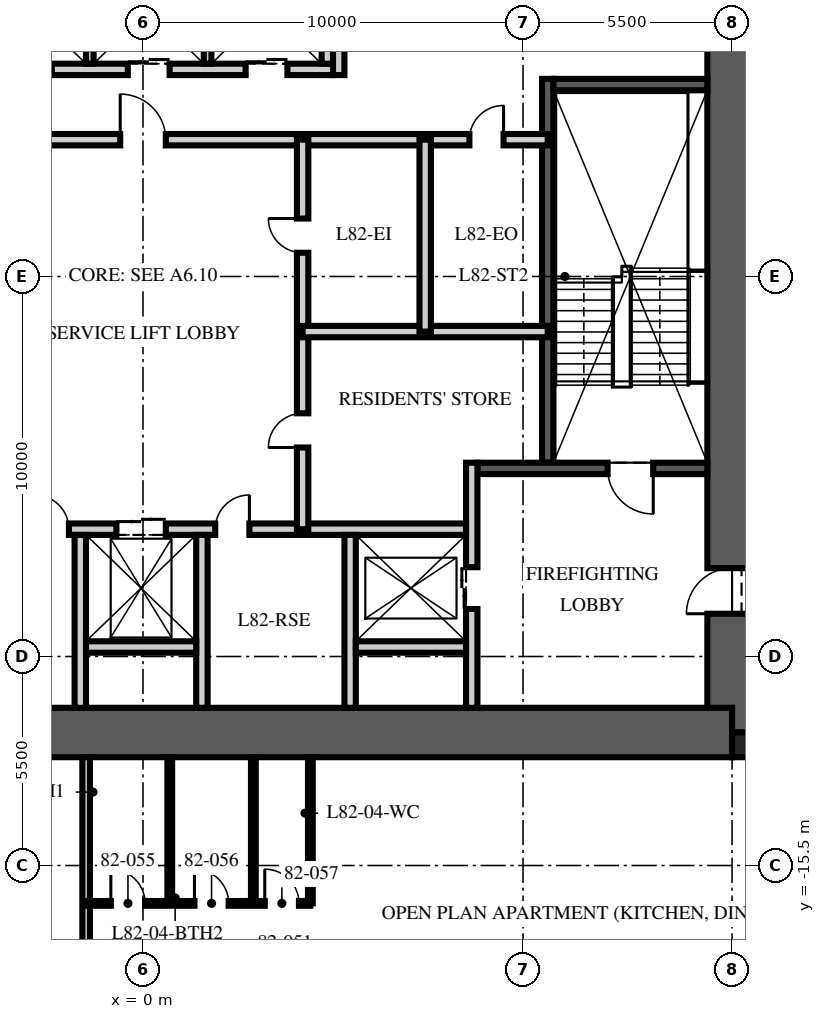
"""IFC4 building model, lengths in metres.
Left out: names, types, materials, properties, quantities, classifications, styles, units other than length and angle.
Written with IfcOpenShell. Run it as: python <this file> out.ifc"""

import sys

from ifc_helpers import new_model, si_unit, direction, frame, frame_2d, origin, origin_2d, place, context, subcontext, project, spatial, rectangle, extrude, element, fill, save


model = new_model("IFC4")
c1 = context("Model", 3, precision=1e-05, world=origin(), true_north=direction((0.0, 1.0)))
c2 = subcontext(c1, "Body", "Model", "MODEL_VIEW")
j1 = project(units=[si_unit("LENGTHUNIT", "METRE"), si_unit("PLANEANGLEUNIT", "RADIAN")], contexts=[c1])
p1 = place(None, origin())
s1 = spatial("IfcSite", under=j1, at=p1, CompositionType="ELEMENT")
p2 = place(p1, origin())
s2 = spatial("IfcBuilding", under=s1, at=p2, CompositionType="ELEMENT")
p3 = place(p2, frame((0.0, 0.0, 327.0)))
s3 = spatial("IfcBuildingStorey", under=s2, at=p3, CompositionType="ELEMENT", Elevation=327.0)
p4 = place(p3, frame((15.5, -12.0, -0.25), z_axis=(0.0, 0.0, 1.0), x_axis=(0.0, 1.0, 0.0)))
e1 = element("IfcWall", 1, at=p4, inside=s3, PredefinedType="SHEAR", context=c2, shape_type="SweptSolid", body=[
    extrude(rectangle(XDim=24.0, YDim=1.3, at=frame_2d((12.0, 0.0))), origin(), (0.0, 0.0, 1.0), 3.75),
])
p5 = place(p4, frame((3.125, 0.0, 0.25)))
e2 = element("IfcOpeningElement", 2, at=p5, cuts=e1, PredefinedType="OPENING", context=c2, shape_type="SweptSolid", body=[
    extrude(rectangle(XDim=1.2, YDim=2.1, at=frame_2d((0.6, 1.05))), frame((0.0, 0.66, 0.0), z_axis=(0.0, -1.0, 0.0), x_axis=(1.0, 0.0, 0.0)), (0.0, 0.0, 1.0), 1.32),
])
p6 = place(p4, frame((19.375, 0.0, 0.25)))
e3 = element("IfcOpeningElement", 3, at=p6, cuts=e1, PredefinedType="OPENING", context=c2, shape_type="SweptSolid", body=[
    extrude(rectangle(XDim=1.8, YDim=2.1, at=frame_2d((0.9, 1.05))), frame((0.0, 0.66, 0.0), z_axis=(0.0, -1.0, 0.0), x_axis=(1.0, 0.0, 0.0)), (0.0, 0.0, 1.0), 1.32),
])
p7 = place(p3, frame((-15.5, -12.0, -0.25), z_axis=(0.0, 0.0, 1.0), x_axis=(1.0, 0.0, 0.0)))
e4 = element("IfcWall", 4, at=p7, inside=s3, PredefinedType="SHEAR", context=c2, shape_type="SweptSolid", body=[
    extrude(rectangle(XDim=31.0, YDim=1.3, at=frame_2d((15.5, 0.0))), origin(), (0.0, 0.0, 1.0), 3.75),
])
p8 = place(p3, frame((15.825, -12.325, -0.25), z_axis=(0.0, 0.0, 1.0), x_axis=(1.0, 0.0, 0.0)))
e5 = element("IfcColumn", 5, at=p8, inside=s3, PredefinedType="COLUMN", context=c2, shape_type="SweptSolid", body=[
    extrude(rectangle(XDim=0.65, YDim=0.65, at=origin_2d()), origin(), (0.0, 0.0, 1.0), 3.75),
])
p9 = place(p3, frame((10.65, -4.9, 0.0), z_axis=(0.0, 0.0, 1.0), x_axis=(0.0, 1.0, 0.0)))
e6 = element("IfcWall", 6, at=p9, inside=s3, PredefinedType="SOLIDWALL", context=c2, shape_type="SweptSolid", body=[
    extrude(rectangle(XDim=10.1, YDim=0.3, at=frame_2d((5.05, 0.0))), origin(), (0.0, 0.0, 1.0), 3.5),
])
p10 = place(p3, frame((14.85, -5.05, 0.0), z_axis=(0.0, 0.0, 1.0), x_axis=(-1.0, 0.0, 0.0)))
e7 = element("IfcWall", 7, at=p10, inside=s3, PredefinedType="SOLIDWALL", context=c2, shape_type="SweptSolid", body=[
    extrude(rectangle(XDim=6.05, YDim=0.3, at=frame_2d((3.025, 0.0))), origin(), (0.0, 0.0, 1.0), 3.5),
])
p11 = place(p10, frame((1.425, 0.0, 0.0)))
e8 = element("IfcOpeningElement", 8, at=p11, cuts=e7, PredefinedType="OPENING", context=c2, shape_type="SweptSolid", body=[
    extrude(rectangle(XDim=1.2, YDim=2.1, at=frame_2d((0.6, 1.05))), frame((0.0, 0.16, 0.0), z_axis=(0.0, -1.0, 0.0), x_axis=(1.0, 0.0, 0.0)), (0.0, 0.0, 1.0), 0.32),
])
p12 = place(p3, frame((14.85, 5.05, 0.0), z_axis=(0.0, 0.0, 1.0), x_axis=(-1.0, 0.0, 0.0)))
e9 = element("IfcWall", 9, at=p12, inside=s3, PredefinedType="SOLIDWALL", context=c2, shape_type="SweptSolid", body=[
    extrude(rectangle(XDim=4.05, YDim=0.3, at=frame_2d((2.025, 0.0))), origin(), (0.0, 0.0, 1.0), 3.5),
])
p13 = place(p3, frame((8.65, -11.35, 0.0), z_axis=(0.0, 0.0, 1.0), x_axis=(0.0, 1.0, 0.0)))
e10 = element("IfcWall", 10, at=p13, inside=s3, PredefinedType="PARTITIONING", context=c2, shape_type="SweptSolid", body=[
    extrude(rectangle(XDim=6.45, YDim=0.3, at=frame_2d((3.225, 0.0))), origin(), (0.0, 0.0, 1.0), 3.5),
])
p14 = place(p13, frame((2.6, 0.0, 0.0)))
e11 = element("IfcOpeningElement", 11, at=p14, cuts=e10, PredefinedType="OPENING", context=c2, shape_type="SweptSolid", body=[
    extrude(rectangle(XDim=1.1, YDim=2.1, at=frame_2d((0.55, 1.05))), frame((0.0, 0.16, 0.0), z_axis=(0.0, -1.0, 0.0), x_axis=(1.0, 0.0, 0.0)), (0.0, 0.0, 1.0), 0.32),
])
p15 = place(p3, frame((-8.5, -6.65, 0.0), z_axis=(0.0, 0.0, 1.0), x_axis=(1.0, 0.0, 0.0)))
e12 = element("IfcWall", 12, at=p15, inside=s3, PredefinedType="PARTITIONING", context=c2, shape_type="SweptSolid", body=[
    extrude(rectangle(XDim=17.0, YDim=0.3, at=frame_2d((8.5, 0.0))), origin(), (0.0, 0.0, 1.0), 3.5),
])
p16 = place(p15, frame((7.8, 0.0, 0.0)))
e13 = element("IfcOpeningElement", 13, at=p16, cuts=e12, PredefinedType="OPENING", context=c2, shape_type="SweptSolid", body=[
    extrude(rectangle(XDim=1.3, YDim=2.4, at=frame_2d((0.65, 1.2))), frame((0.0, 0.16, 0.0), z_axis=(0.0, -1.0, 0.0), x_axis=(1.0, 0.0, 0.0)), (0.0, 0.0, 1.0), 0.32),
])
p17 = place(p15, frame((5.65, 0.0, 0.0)))
e14 = element("IfcOpeningElement", 14, at=p17, cuts=e12, PredefinedType="OPENING", context=c2, shape_type="SweptSolid", body=[
    extrude(rectangle(XDim=0.9, YDim=2.1, at=frame_2d((0.45, 1.05))), frame((0.0, 0.16, 0.0), z_axis=(0.0, -1.0, 0.0), x_axis=(1.0, 0.0, 0.0)), (0.0, 0.0, 1.0), 0.32),
])
p18 = place(p15, frame((10.4, 0.0, 0.0)))
e15 = element("IfcOpeningElement", 15, at=p18, cuts=e12, PredefinedType="OPENING", context=c2, shape_type="SweptSolid", body=[
    extrude(rectangle(XDim=0.9, YDim=2.1, at=frame_2d((0.45, 1.05))), frame((0.0, 0.16, 0.0), z_axis=(0.0, -1.0, 0.0), x_axis=(1.0, 0.0, 0.0)), (0.0, 0.0, 1.0), 0.32),
])
for number, where, z_axis, x_axis in (
    (16, (-1.65, -11.35, 0.0), (0.0, 0.0, 1.0), (0.0, 1.0, 0.0)),
    (17, (1.55, -11.35, 0.0), (0.0, 0.0, 1.0), (0.0, 1.0, 0.0)),
    (18, (5.45, -11.35, 0.0), (0.0, 0.0, 1.0), (0.0, 1.0, 0.0)),
):
    element("IfcWall", number, at=place(p3, frame(where, z_axis=z_axis, x_axis=x_axis)), inside=s3, PredefinedType="PARTITIONING", context=c2, shape_type="SweptSolid", body=[
        extrude(rectangle(XDim=4.55, YDim=0.3, at=frame_2d((2.275, 0.0))), origin(), (0.0, 0.0, 1.0), 3.5),
    ])
for number, where, z_axis, x_axis in (
    (19, (-1.5, -9.75, 0.0), (0.0, 0.0, 1.0), (1.0, 0.0, 0.0)),
    (20, (5.6, -9.75, 0.0), (0.0, 0.0, 1.0), (1.0, 0.0, 0.0)),
):
    element("IfcWall", number, at=place(p3, frame(where, z_axis=z_axis, x_axis=x_axis)), inside=s3, PredefinedType="PARTITIONING", context=c2, shape_type="SweptSolid", body=[
        extrude(rectangle(XDim=2.9, YDim=0.3, at=frame_2d((1.45, 0.0))), origin(), (0.0, 0.0, 1.0), 3.5),
    ])
p19 = place(p3, frame((-4.7, 5.45, 0.0), z_axis=(0.0, 0.0, 1.0), x_axis=(1.0, 0.0, 0.0)))
e21 = element("IfcWall", 21, at=p19, inside=s3, PredefinedType="PARTITIONING", context=c2, shape_type="SweptSolid", body=[
    extrude(rectangle(XDim=9.7, YDim=0.3, at=frame_2d((4.85, 0.0))), origin(), (0.0, 0.0, 1.0), 3.5),
])
p20 = place(p19, frame((1.2, 0.0, 0.0)))
e22 = element("IfcOpeningElement", 22, at=p20, cuts=e21, PredefinedType="OPENING", context=c2, shape_type="SweptSolid", body=[
    extrude(rectangle(XDim=1.1, YDim=2.1, at=frame_2d((0.55, 1.05))), frame((0.0, 0.16, 0.0), z_axis=(0.0, -1.0, 0.0), x_axis=(1.0, 0.0, 0.0)), (0.0, 0.0, 1.0), 0.32),
])
p21 = place(p19, frame((4.3, 0.0, 0.0)))
e23 = element("IfcOpeningElement", 23, at=p21, cuts=e21, PredefinedType="OPENING", context=c2, shape_type="SweptSolid", body=[
    extrude(rectangle(XDim=1.1, YDim=2.1, at=frame_2d((0.55, 1.05))), frame((0.0, 0.16, 0.0), z_axis=(0.0, -1.0, 0.0), x_axis=(1.0, 0.0, 0.0)), (0.0, 0.0, 1.0), 0.32),
])
p22 = place(p19, frame((7.4, 0.0, 0.0)))
e24 = element("IfcOpeningElement", 24, at=p22, cuts=e21, PredefinedType="OPENING", context=c2, shape_type="SweptSolid", body=[
    extrude(rectangle(XDim=1.1, YDim=2.1, at=frame_2d((0.55, 1.05))), frame((0.0, 0.16, 0.0), z_axis=(0.0, -1.0, 0.0), x_axis=(1.0, 0.0, 0.0)), (0.0, 0.0, 1.0), 0.32),
])
p23 = place(p3, frame((4.85, 5.6, 0.0), z_axis=(0.0, 0.0, 1.0), x_axis=(0.0, 1.0, 0.0)))
e25 = element("IfcWall", 25, at=p23, inside=s3, PredefinedType="PARTITIONING", context=c2, shape_type="SweptSolid", body=[
    extrude(rectangle(XDim=2.8, YDim=0.3, at=frame_2d((1.4, 0.0))), origin(), (0.0, 0.0, 1.0), 3.5),
])
for number, where, z_axis, x_axis in (
    (26, (-1.4, 5.6, 0.0), (0.0, 0.0, 1.0), (0.0, 1.0, 0.0)),
    (27, (1.7, 5.6, 0.0), (0.0, 0.0, 1.0), (0.0, 1.0, 0.0)),
):
    element("IfcWall", number, at=place(p3, frame(where, z_axis=z_axis, x_axis=x_axis)), inside=s3, PredefinedType="PARTITIONING", context=c2, shape_type="SweptSolid", body=[
        extrude(rectangle(XDim=2.8, YDim=0.2, at=frame_2d((1.4, 0.0))), origin(), (0.0, 0.0, 1.0), 3.5),
    ])
p24 = place(p3, frame((-10.65, 3.6, 0.0), z_axis=(0.0, 0.0, 1.0), x_axis=(1.0, 0.0, 0.0)))
e28 = element("IfcWall", 28, at=p24, inside=s3, PredefinedType="PARTITIONING", context=c2, shape_type="SweptSolid", body=[
    extrude(rectangle(XDim=21.3, YDim=0.3, at=frame_2d((10.65, 0.0))), origin(), (0.0, 0.0, 1.0), 3.5),
])
p25 = place(p24, frame((10.05, 0.0, 0.0)))
e29 = element("IfcOpeningElement", 29, at=p25, cuts=e28, PredefinedType="OPENING", context=c2, shape_type="SweptSolid", body=[
    extrude(rectangle(XDim=1.2, YDim=2.1, at=frame_2d((0.6, 1.05))), frame((0.0, 0.16, 0.0), z_axis=(0.0, -1.0, 0.0), x_axis=(1.0, 0.0, 0.0)), (0.0, 0.0, 1.0), 0.32),
])
p26 = place(p24, frame((19.238, 0.0, 0.0)))
e30 = element("IfcOpeningElement", 30, at=p26, cuts=e28, PredefinedType="OPENING", context=c2, shape_type="SweptSolid", body=[
    extrude(rectangle(XDim=0.9, YDim=2.1, at=frame_2d((0.45, 1.05))), frame((0.0, 0.16, 0.0), z_axis=(0.0, -1.0, 0.0), x_axis=(1.0, 0.0, 0.0)), (0.0, 0.0, 1.0), 0.32),
])
p27 = place(p3, frame((4.2, -6.65, 0.0), z_axis=(0.0, 0.0, 1.0), x_axis=(0.0, 1.0, 0.0)))
e31 = element("IfcWall", 31, at=p27, inside=s3, PredefinedType="PARTITIONING", context=c2, shape_type="SweptSolid", body=[
    extrude(rectangle(XDim=10.25, YDim=0.3, at=frame_2d((5.125, 0.0))), origin(), (0.0, 0.0, 1.0), 3.5),
])
p28 = place(p27, frame((2.15, 0.0, 0.0)))
e32 = element("IfcOpeningElement", 32, at=p28, cuts=e31, PredefinedType="OPENING", context=c2, shape_type="SweptSolid", body=[
    extrude(rectangle(XDim=0.9, YDim=2.1, at=frame_2d((0.45, 1.05))), frame((0.0, 0.16, 0.0), z_axis=(0.0, -1.0, 0.0), x_axis=(1.0, 0.0, 0.0)), (0.0, 0.0, 1.0), 0.32),
])
p29 = place(p27, frame((7.275, 0.0, 0.0)))
e33 = element("IfcOpeningElement", 33, at=p29, cuts=e31, PredefinedType="OPENING", context=c2, shape_type="SweptSolid", body=[
    extrude(rectangle(XDim=0.9, YDim=2.1, at=frame_2d((0.45, 1.05))), frame((0.0, 0.16, 0.0), z_axis=(0.0, -1.0, 0.0), x_axis=(1.0, 0.0, 0.0)), (0.0, 0.0, 1.0), 0.32),
])
p30 = place(p3, frame((10.65, -1.45, 0.0), z_axis=(0.0, 0.0, 1.0), x_axis=(-1.0, 0.0, 0.0)))
e34 = element("IfcWall", 34, at=p30, inside=s3, PredefinedType="PARTITIONING", context=c2, shape_type="SweptSolid", body=[
    extrude(rectangle(XDim=6.45, YDim=0.3, at=frame_2d((3.225, 0.0))), origin(), (0.0, 0.0, 1.0), 3.5),
])
p31 = place(p3, frame((7.425, -1.45, 0.0), z_axis=(0.0, 0.0, 1.0), x_axis=(0.0, 1.0, 0.0)))
e35 = element("IfcWall", 35, at=p31, inside=s3, PredefinedType="PARTITIONING", context=c2, shape_type="SweptSolid", body=[
    extrude(rectangle(XDim=5.05, YDim=0.3, at=frame_2d((2.525, 0.0))), origin(), (0.0, 0.0, 1.0), 3.5),
])
p32 = place(p3, frame((5.15, 5.3, 0.0), z_axis=(0.0, 0.0, 1.0), x_axis=(0.0, 1.0, 0.0)))
e36 = element("IfcWall", 36, at=p32, inside=s3, PredefinedType="PARTITIONING", context=c2, shape_type="SweptSolid", body=[
    extrude(rectangle(XDim=6.05, YDim=0.3, at=frame_2d((3.025, 0.0))), origin(), (0.0, 0.0, 1.0), 3.5),
])
p33 = place(p32, frame((4.225, 0.0, 0.0)))
e37 = element("IfcOpeningElement", 37, at=p33, cuts=e36, PredefinedType="OPENING", context=c2, shape_type="SweptSolid", body=[
    extrude(rectangle(XDim=0.9, YDim=2.1, at=frame_2d((0.45, 1.05))), frame((0.0, 0.16, 0.0), z_axis=(0.0, -1.0, 0.0), x_axis=(1.0, 0.0, 0.0)), (0.0, 0.0, 1.0), 0.32),
])
p34 = place(p3, frame((-1.496, -12.65, 0.0), z_axis=(0.0, 0.0, 1.0), x_axis=(0.0, -1.0, 0.0)))
e38 = element("IfcWall", 38, at=p34, inside=s3, PredefinedType="PARTITIONING", context=c2, shape_type="SweptSolid", body=[
    extrude(rectangle(XDim=10.6, YDim=0.2, at=frame_2d((5.3, 0.0))), origin(), (0.0, 0.0, 1.0), 3.01),
])
p35 = place(p3, frame((-1.496, -16.496, 0.0), z_axis=(0.0, 0.0, 1.0), x_axis=(1.0, 0.0, 0.0)))
e39 = element("IfcWall", 39, at=p35, inside=s3, PredefinedType="PARTITIONING", context=c2, shape_type="SweptSolid", body=[
    extrude(rectangle(XDim=5.9, YDim=0.125, at=frame_2d((2.95, 0.0))), origin(), (0.0, 0.0, 1.0), 2.9),
])
p36 = place(p35, frame((0.65, 0.0, 0.0)))
e40 = element("IfcOpeningElement", 40, at=p36, cuts=e39, PredefinedType="OPENING", context=c2, shape_type="SweptSolid", body=[
    extrude(rectangle(XDim=0.9, YDim=2.1, at=frame_2d((0.45, 1.05))), frame((0.0, 0.073, 0.0), z_axis=(0.0, -1.0, 0.0), x_axis=(1.0, 0.0, 0.0)), (0.0, 0.0, 1.0), 0.145),
])
p37 = place(p35, frame((2.85, 0.0, 0.0)))
e41 = element("IfcOpeningElement", 41, at=p37, cuts=e39, PredefinedType="OPENING", context=c2, shape_type="SweptSolid", body=[
    extrude(rectangle(XDim=0.9, YDim=2.1, at=frame_2d((0.45, 1.05))), frame((0.0, 0.073, 0.0), z_axis=(0.0, -1.0, 0.0), x_axis=(1.0, 0.0, 0.0)), (0.0, 0.0, 1.0), 0.145),
])
p38 = place(p35, frame((4.7, 0.0, 0.0)))
e42 = element("IfcOpeningElement", 42, at=p38, cuts=e39, PredefinedType="OPENING", context=c2, shape_type="SweptSolid", body=[
    extrude(rectangle(XDim=0.9, YDim=2.1, at=frame_2d((0.45, 1.05))), frame((0.0, 0.073, 0.0), z_axis=(0.0, -1.0, 0.0), x_axis=(1.0, 0.0, 0.0)), (0.0, 0.0, 1.0), 0.145),
])
for number, where, z_axis, x_axis in (
    (43, (0.704, -12.65, 0.0), (0.0, 0.0, 1.0), (0.0, -1.0, 0.0)),
    (44, (2.904, -12.65, 0.0), (0.0, 0.0, 1.0), (0.0, -1.0, 0.0)),
    (45, (4.404, -12.65, 0.0), (0.0, 0.0, 1.0), (0.0, -1.0, 0.0)),
):
    element("IfcWall", number, at=place(p3, frame(where, z_axis=z_axis, x_axis=x_axis)), inside=s3, PredefinedType="PARTITIONING", context=c2, shape_type="SweptSolid", body=[
        extrude(rectangle(XDim=3.846, YDim=0.125, at=frame_2d((1.923, 0.0))), origin(), (0.0, 0.0, 1.0), 3.5),
    ])
p39 = place(p11, origin())
e46 = element("IfcDoor", 46, at=p39, inside=s3, OperationType="SINGLE_SWING_LEFT", PredefinedType="DOOR", context=c2, shape_type="SweptSolid", body=[
    extrude(rectangle(XDim=1.2, YDim=2.1, at=frame_2d((0.6, 1.05))), frame((0.0, 0.025, 0.0), z_axis=(0.0, -1.0, 0.0), x_axis=(1.0, 0.0, 0.0)), (0.0, 0.0, 1.0), 0.05),
])
fill(e8, e46)
p40 = place(p5, origin())
e47 = element("IfcDoor", 47, at=p40, inside=s3, OperationType="SINGLE_SWING_LEFT", PredefinedType="DOOR", context=c2, shape_type="SweptSolid", body=[
    extrude(rectangle(XDim=1.2, YDim=2.1, at=frame_2d((0.6, 1.05))), frame((0.0, 0.025, 0.0), z_axis=(0.0, -1.0, 0.0), x_axis=(1.0, 0.0, 0.0)), (0.0, 0.0, 1.0), 0.05),
])
fill(e2, e47)
p41 = place(p14, origin())
e48 = element("IfcDoor", 48, at=p41, inside=s3, OperationType="DOUBLE_DOOR_SLIDING", PredefinedType="DOOR", context=c2, shape_type="SweptSolid", body=[
    extrude(rectangle(XDim=1.1, YDim=2.1, at=frame_2d((0.55, 1.05))), frame((0.0, 0.025, 0.0), z_axis=(0.0, -1.0, 0.0), x_axis=(1.0, 0.0, 0.0)), (0.0, 0.0, 1.0), 0.05),
])
fill(e11, e48)
p42 = place(p21, origin())
e49 = element("IfcDoor", 49, at=p42, inside=s3, OperationType="DOUBLE_DOOR_SLIDING", PredefinedType="DOOR", context=c2, shape_type="SweptSolid", body=[
    extrude(rectangle(XDim=1.1, YDim=2.1, at=frame_2d((0.55, 1.05))), frame((0.0, 0.025, 0.0), z_axis=(0.0, -1.0, 0.0), x_axis=(1.0, 0.0, 0.0)), (0.0, 0.0, 1.0), 0.05),
])
fill(e23, e49)
p43 = place(p22, origin())
e50 = element("IfcDoor", 50, at=p43, inside=s3, OperationType="DOUBLE_DOOR_SLIDING", PredefinedType="DOOR", context=c2, shape_type="SweptSolid", body=[
    extrude(rectangle(XDim=1.1, YDim=2.1, at=frame_2d((0.55, 1.05))), frame((0.0, 0.025, 0.0), z_axis=(0.0, -1.0, 0.0), x_axis=(1.0, 0.0, 0.0)), (0.0, 0.0, 1.0), 0.05),
])
fill(e24, e50)
p44 = place(p16, origin())
e51 = element("IfcDoor", 51, at=p44, inside=s3, OperationType="DOUBLE_DOOR_SLIDING", PredefinedType="DOOR", context=c2, shape_type="SweptSolid", body=[
    extrude(rectangle(XDim=1.3, YDim=2.4, at=frame_2d((0.65, 1.2))), frame((0.0, 0.025, 0.0), z_axis=(0.0, -1.0, 0.0), x_axis=(1.0, 0.0, 0.0)), (0.0, 0.0, 1.0), 0.05),
])
fill(e13, e51)
p45 = place(p25, origin())
e52 = element("IfcDoor", 52, at=p45, inside=s3, OperationType="SINGLE_SWING_LEFT", PredefinedType="DOOR", context=c2, shape_type="SweptSolid", body=[
    extrude(rectangle(XDim=1.2, YDim=2.1, at=frame_2d((0.6, 1.05))), frame((0.0, 0.025, 0.0), z_axis=(0.0, -1.0, 0.0), x_axis=(1.0, 0.0, 0.0)), (0.0, 0.0, 1.0), 0.05),
])
fill(e29, e52)
p46 = place(p17, origin())
e53 = element("IfcDoor", 53, at=p46, inside=s3, OperationType="SINGLE_SWING_LEFT", PredefinedType="DOOR", context=c2, shape_type="SweptSolid", body=[
    extrude(rectangle(XDim=0.9, YDim=2.1, at=frame_2d((0.45, 1.05))), frame((0.0, 0.025, 0.0), z_axis=(0.0, -1.0, 0.0), x_axis=(1.0, 0.0, 0.0)), (0.0, 0.0, 1.0), 0.05),
])
fill(e14, e53)
p47 = place(p18, origin())
e54 = element("IfcDoor", 54, at=p47, inside=s3, OperationType="SINGLE_SWING_RIGHT", PredefinedType="DOOR", context=c2, shape_type="SweptSolid", body=[
    extrude(rectangle(XDim=0.9, YDim=2.1, at=frame_2d((0.45, 1.05))), frame((0.0, 0.025, 0.0), z_axis=(0.0, -1.0, 0.0), x_axis=(1.0, 0.0, 0.0)), (0.0, 0.0, 1.0), 0.05),
])
fill(e15, e54)
p48 = place(p28, origin())
e55 = element("IfcDoor", 55, at=p48, inside=s3, OperationType="SINGLE_SWING_LEFT", PredefinedType="DOOR", context=c2, shape_type="SweptSolid", body=[
    extrude(rectangle(XDim=0.9, YDim=2.1, at=frame_2d((0.45, 1.05))), frame((0.0, 0.025, 0.0), z_axis=(0.0, -1.0, 0.0), x_axis=(1.0, 0.0, 0.0)), (0.0, 0.0, 1.0), 0.05),
])
fill(e32, e55)
p49 = place(p29, origin())
e56 = element("IfcDoor", 56, at=p49, inside=s3, OperationType="SINGLE_SWING_RIGHT", PredefinedType="DOOR", context=c2, shape_type="SweptSolid", body=[
    extrude(rectangle(XDim=0.9, YDim=2.1, at=frame_2d((0.45, 1.05))), frame((0.0, 0.025, 0.0), z_axis=(0.0, -1.0, 0.0), x_axis=(1.0, 0.0, 0.0)), (0.0, 0.0, 1.0), 0.05),
])
fill(e33, e56)
p50 = place(p26, origin())
e57 = element("IfcDoor", 57, at=p50, inside=s3, OperationType="SINGLE_SWING_RIGHT", PredefinedType="DOOR", context=c2, shape_type="SweptSolid", body=[
    extrude(rectangle(XDim=0.9, YDim=2.1, at=frame_2d((0.45, 1.05))), frame((0.0, 0.025, 0.0), z_axis=(0.0, -1.0, 0.0), x_axis=(1.0, 0.0, 0.0)), (0.0, 0.0, 1.0), 0.05),
])
fill(e30, e57)
p51 = place(p36, origin())
e58 = element("IfcDoor", 58, at=p51, inside=s3, OperationType="SINGLE_SWING_LEFT", PredefinedType="DOOR", context=c2, shape_type="SweptSolid", body=[
    extrude(rectangle(XDim=0.9, YDim=2.1, at=frame_2d((0.45, 1.05))), frame((0.0, 0.025, 0.0), z_axis=(0.0, -1.0, 0.0), x_axis=(1.0, 0.0, 0.0)), (0.0, 0.0, 1.0), 0.05),
])
fill(e40, e58)
p52 = place(p37, origin())
e59 = element("IfcDoor", 59, at=p52, inside=s3, OperationType="SINGLE_SWING_LEFT", PredefinedType="DOOR", context=c2, shape_type="SweptSolid", body=[
    extrude(rectangle(XDim=0.9, YDim=2.1, at=frame_2d((0.45, 1.05))), frame((0.0, 0.025, 0.0), z_axis=(0.0, -1.0, 0.0), x_axis=(1.0, 0.0, 0.0)), (0.0, 0.0, 1.0), 0.05),
])
fill(e41, e59)
p53 = place(p38, origin())
e60 = element("IfcDoor", 60, at=p53, inside=s3, OperationType="SINGLE_SWING_LEFT", PredefinedType="DOOR", context=c2, shape_type="SweptSolid", body=[
    extrude(rectangle(XDim=0.9, YDim=2.1, at=frame_2d((0.45, 1.05))), frame((0.0, 0.025, 0.0), z_axis=(0.0, -1.0, 0.0), x_axis=(1.0, 0.0, 0.0)), (0.0, 0.0, 1.0), 0.05),
])
fill(e42, e60)
save(model, sys.argv[1])
